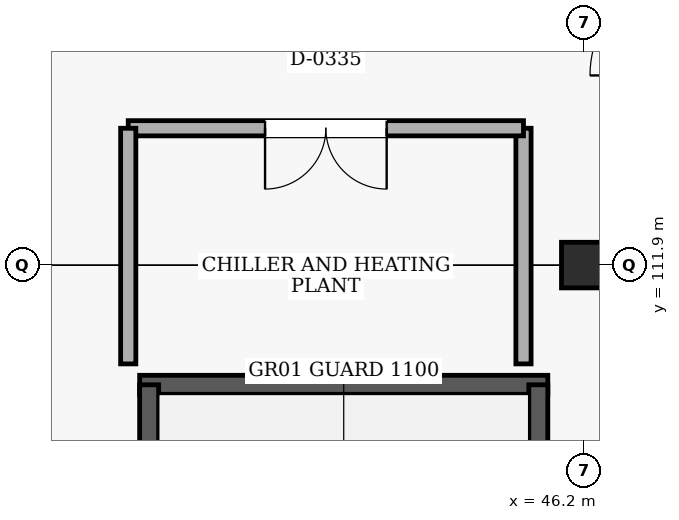
"""IFC4 building model, lengths in metres.
Left out: names, types, materials, properties, quantities, classifications, styles, units other than length and angle.
Written with IfcOpenShell. Run it as: python <this file> out.ifc"""

import sys

from ifc_helpers import new_model, si_unit, direction, frame, frame_2d, origin, origin_2d, place, context, subcontext, project, spatial, rectangle, extrude, element, fill, save


model = new_model("IFC4")
c1 = context("Model", 3, precision=1e-05, world=origin(), true_north=direction((0.0, 1.0)))
c2 = subcontext(c1, "Body", "Model", "MODEL_VIEW")
j1 = project(units=[si_unit("LENGTHUNIT", "METRE"), si_unit("PLANEANGLEUNIT", "RADIAN")], contexts=[c1])
p1 = place(None, origin())
s1 = spatial("IfcSite", under=j1, at=p1, CompositionType="ELEMENT")
p2 = place(p1, origin())
s2 = spatial("IfcBuilding", under=s1, at=p2, CompositionType="ELEMENT")
p3 = place(p2, origin())
s3 = spatial("IfcBuildingStorey", under=s2, at=p3, CompositionType="ELEMENT", Elevation=0.0)
p4 = place(p3, frame((46.2, 111.9, 0.0), z_axis=(0.0, 0.0, 1.0), x_axis=(1.0, 0.0, 0.0)))
e1 = element("IfcColumn", 1, at=p4, inside=s3, PredefinedType="COLUMN", context=c2, shape_type="SweptSolid", body=[
    extrude(rectangle(XDim=0.6, YDim=0.6, at=origin_2d()), origin(), (0.0, 0.0, 1.0), 5.4),
])
p5 = place(p3, frame((45.72, 110.325, 0.0), z_axis=(0.0, 0.0, 1.0), x_axis=(-1.0, 0.0, 0.0)))
e2 = element("IfcWall", 2, at=p5, inside=s3, PredefinedType="SHEAR", context=c2, shape_type="SweptSolid", body=[
    extrude(rectangle(XDim=5.37, YDim=0.25, at=frame_2d((2.685, 0.0))), origin(), (0.0, 0.0, 1.0), 5.08),
])
p6 = place(p3, frame((40.475, 99.475, 0.0), z_axis=(0.0, 0.0, 1.0), x_axis=(0.0, 1.0, 0.0)))
e3 = element("IfcWall", 3, at=p6, inside=s3, PredefinedType="SHEAR", context=c2, shape_type="SweptSolid", body=[
    extrude(rectangle(XDim=10.85, YDim=0.25, at=frame_2d((5.425, 0.0))), origin(), (0.0, 0.0, 1.0), 5.08),
])
p7 = place(p6, frame((0.52, 0.0, 0.0)))
e4 = element("IfcOpeningElement", 4, at=p7, cuts=e3, PredefinedType="OPENING", context=c2, shape_type="SweptSolid", body=[
    extrude(rectangle(XDim=1.4, YDim=2.15, at=frame_2d((0.7, 1.075))), frame((0.0, 0.135, 0.0), z_axis=(0.0, -1.0, 0.0), x_axis=(1.0, 0.0, 0.0)), (0.0, 0.0, 1.0), 0.27),
])
p8 = place(p3, frame((45.595, 99.475, 0.0), z_axis=(0.0, 0.0, 1.0), x_axis=(0.0, 1.0, 0.0)))
e5 = element("IfcWall", 5, at=p8, inside=s3, PredefinedType="SHEAR", context=c2, shape_type="SweptSolid", body=[
    extrude(rectangle(XDim=10.85, YDim=0.25, at=frame_2d((5.425, 0.0))), origin(), (0.0, 0.0, 1.0), 5.08),
])
p9 = place(p3, frame((45.4, 110.6, 0.0), z_axis=(0.0, 0.0, 1.0), x_axis=(0.0, 1.0, 0.0)))
e6 = element("IfcWall", 6, at=p9, inside=s3, PredefinedType="PARTITIONING", context=c2, shape_type="SweptSolid", body=[
    extrude(rectangle(XDim=3.1, YDim=0.2, at=frame_2d((1.55, 0.0))), origin(), (0.0, 0.0, 1.0), 5.08),
])
p10 = place(p3, frame((45.4, 113.7, 0.0), z_axis=(0.0, 0.0, 1.0), x_axis=(-1.0, 0.0, 0.0)))
e7 = element("IfcWall", 7, at=p10, inside=s3, PredefinedType="PARTITIONING", context=c2, shape_type="SweptSolid", body=[
    extrude(rectangle(XDim=5.2, YDim=0.2, at=frame_2d((2.6, 0.0))), origin(), (0.0, 0.0, 1.0), 5.08),
])
p11 = place(p10, frame((1.8, 0.0, 0.0)))
e8 = element("IfcOpeningElement", 8, at=p11, cuts=e7, PredefinedType="OPENING", context=c2, shape_type="SweptSolid", body=[
    extrude(rectangle(XDim=1.6, YDim=2.2, at=frame_2d((0.8, 1.1))), frame((0.0, 0.11, 0.0), z_axis=(0.0, -1.0, 0.0), x_axis=(1.0, 0.0, 0.0)), (0.0, 0.0, 1.0), 0.22),
])
p12 = place(p3, frame((40.2, 113.7, 0.0), z_axis=(0.0, 0.0, 1.0), x_axis=(0.0, -1.0, 0.0)))
e9 = element("IfcWall", 9, at=p12, inside=s3, PredefinedType="PARTITIONING", context=c2, shape_type="SweptSolid", body=[
    extrude(rectangle(XDim=3.1, YDim=0.2, at=frame_2d((1.55, 0.0))), origin(), (0.0, 0.0, 1.0), 5.08),
])
p13 = place(p11, origin())
e10 = element("IfcDoor", 10, at=p13, inside=s3, OperationType="DOUBLE_DOOR_SINGLE_SWING", PredefinedType="DOOR", context=c2, shape_type="SweptSolid", body=[
    extrude(rectangle(XDim=1.6, YDim=2.2, at=frame_2d((0.8, 1.1))), frame((0.0, 0.025, 0.0), z_axis=(0.0, -1.0, 0.0), x_axis=(1.0, 0.0, 0.0)), (0.0, 0.0, 1.0), 0.05),
])
fill(e8, e10)
save(model, sys.argv[1])
